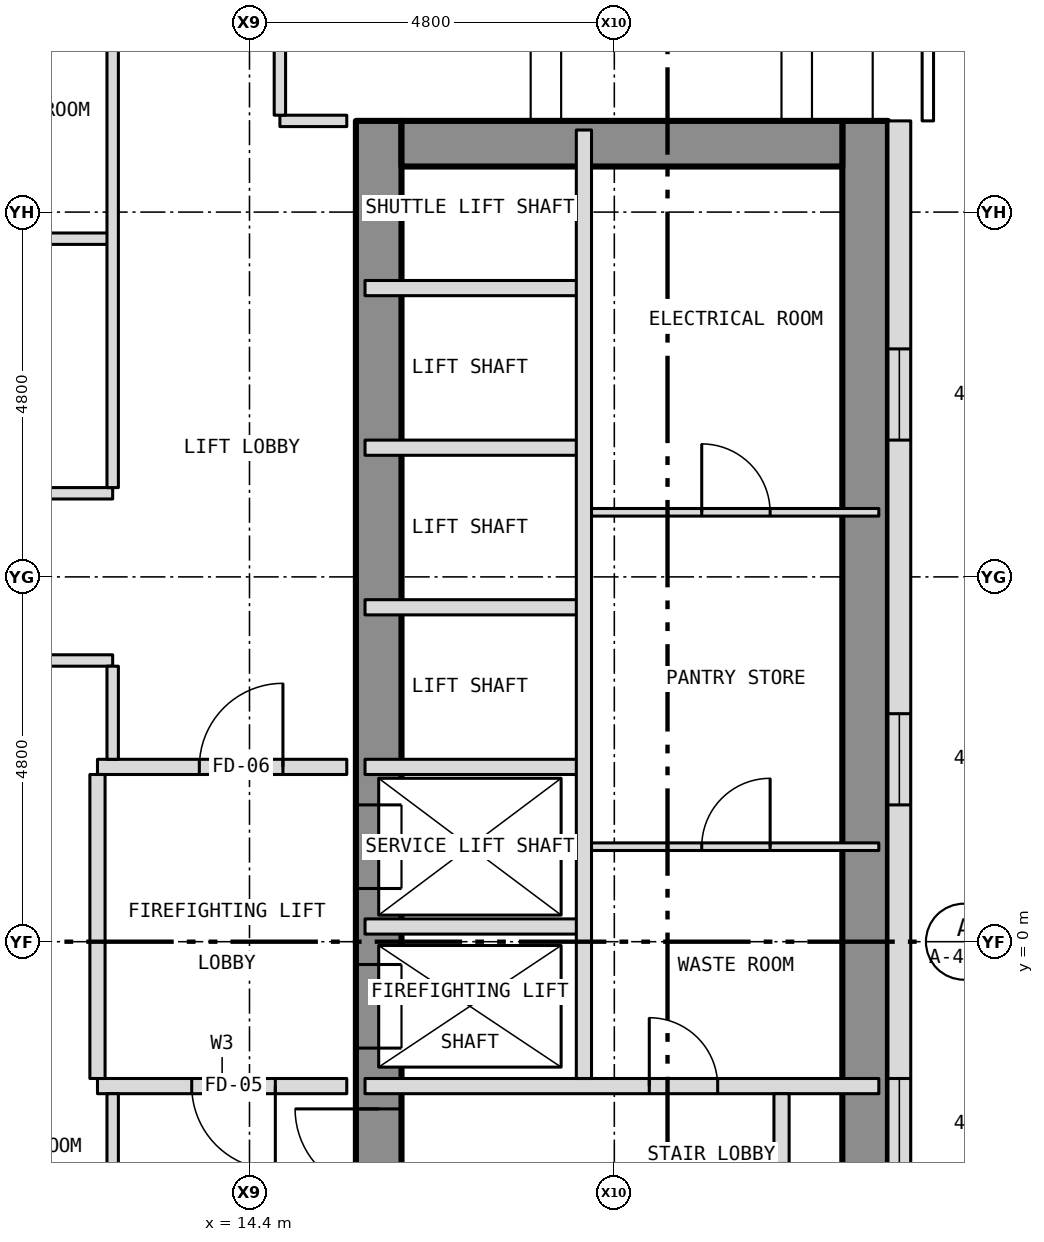
"""IFC4 building model, lengths in metres.
Left out: names, types, materials, properties, quantities, classifications, styles, units other than length and angle.
Written with IfcOpenShell. Run it as: python <this file> out.ifc"""

import sys

from ifc_helpers import new_model, si_unit, direction, frame, frame_2d, origin, place, context, subcontext, project, spatial, rectangle, extrude, element, fill, save


model = new_model("IFC4")
c1 = context("Model", 3, precision=1e-05, world=origin(), true_north=direction((0.0, 1.0)))
c2 = subcontext(c1, "Body", "Model", "MODEL_VIEW")
j1 = project(units=[si_unit("LENGTHUNIT", "METRE"), si_unit("PLANEANGLEUNIT", "RADIAN")], contexts=[c1])
p1 = place(None, origin())
s1 = spatial("IfcSite", under=j1, at=p1, CompositionType="ELEMENT")
p2 = place(p1, origin())
s2 = spatial("IfcBuilding", under=s1, at=p2, CompositionType="ELEMENT")
p3 = place(p2, frame((0.0, 0.0, 138.0)))
s3 = spatial("IfcBuildingStorey", under=s2, at=p3, CompositionType="ELEMENT", Elevation=138.0)
p4 = place(p3, frame((16.1, -10.8, 0.0), z_axis=(0.0, 0.0, 1.0), x_axis=(0.0, 1.0, 0.0)))
e1 = element("IfcWall", 1, at=p4, inside=s3, PredefinedType="SHEAR", context=c2, shape_type="SweptSolid", body=[
    extrude(rectangle(XDim=21.6, YDim=0.6, at=frame_2d((10.8, 0.0))), origin(), (0.0, 0.0, 1.0), 3.9),
])
p5 = place(p4, frame((9.4, 0.0, 0.0)))
e2 = element("IfcOpeningElement", 2, at=p5, cuts=e1, PredefinedType="OPENING", context=c2, shape_type="SweptSolid", body=[
    extrude(rectangle(XDim=1.1, YDim=2.1, at=frame_2d((0.55, 1.05))), frame((0.0, 0.312, 0.0), z_axis=(0.0, -1.0, 0.0), x_axis=(1.0, 0.0, 0.0)), (0.0, 0.0, 1.0), 0.624),
])
p6 = place(p4, frame((11.5, 0.0, 0.0)))
e3 = element("IfcOpeningElement", 3, at=p6, cuts=e1, PredefinedType="OPENING", context=c2, shape_type="SweptSolid", body=[
    extrude(rectangle(XDim=1.1, YDim=2.1, at=frame_2d((0.55, 1.05))), frame((0.0, 0.312, 0.0), z_axis=(0.0, -1.0, 0.0), x_axis=(1.0, 0.0, 0.0)), (0.0, 0.0, 1.0), 0.624),
])
p7 = place(p4, frame((5.642, 0.0, 0.0)))
e4 = element("IfcOpeningElement", 4, at=p7, cuts=e1, PredefinedType="OPENING", context=c2, shape_type="SweptSolid", body=[
    extrude(rectangle(XDim=1.1, YDim=2.1, at=frame_2d((0.55, 1.05))), frame((0.0, 0.312, 0.0), z_axis=(0.0, -1.0, 0.0), x_axis=(1.0, 0.0, 0.0)), (0.0, 0.0, 1.0), 0.624),
])
p8 = place(p4, frame((7.5, 0.0, 0.0)))
e5 = element("IfcOpeningElement", 5, at=p8, cuts=e1, PredefinedType="OPENING", context=c2, shape_type="SweptSolid", body=[
    extrude(rectangle(XDim=1.1, YDim=2.1, at=frame_2d((0.55, 1.05))), frame((0.0, 0.312, 0.0), z_axis=(0.0, -1.0, 0.0), x_axis=(1.0, 0.0, 0.0)), (0.0, 0.0, 1.0), 0.624),
])
p9 = place(p3, frame((22.5, -10.8, 0.0), z_axis=(0.0, 0.0, 1.0), x_axis=(0.0, 1.0, 0.0)))
e6 = element("IfcWall", 6, at=p9, inside=s3, PredefinedType="SHEAR", context=c2, shape_type="SweptSolid", body=[
    extrude(rectangle(XDim=21.6, YDim=0.6, at=frame_2d((10.8, 0.0))), origin(), (0.0, 0.0, 1.0), 3.9),
])
p10 = place(p3, frame((16.4, 10.5, 0.0), z_axis=(0.0, 0.0, 1.0), x_axis=(1.0, 0.0, 0.0)))
e7 = element("IfcWall", 7, at=p10, inside=s3, PredefinedType="SHEAR", context=c2, shape_type="SweptSolid", body=[
    extrude(rectangle(XDim=5.8, YDim=0.6, at=frame_2d((2.9, 0.0))), origin(), (0.0, 0.0, 1.0), 3.9),
])
p11 = place(p3, frame((22.95, -10.8, 0.0), z_axis=(0.0, 0.0, 1.0), x_axis=(0.0, 1.0, 0.0)))
e8 = element("IfcWall", 8, at=p11, inside=s3, PredefinedType="SOLIDWALL", context=c2, shape_type="SweptSolid", body=[
    extrude(rectangle(XDim=21.6, YDim=0.3, at=frame_2d((10.8, 0.0))), origin(), (0.0, 0.0, 1.0), 4.5),
])
p12 = place(p11, frame((3.0, 0.0, 2.2)))
e9 = element("IfcOpeningElement", 9, at=p12, cuts=e8, PredefinedType="OPENING", context=c2, shape_type="SweptSolid", body=[
    extrude(rectangle(XDim=1.2, YDim=0.6, at=frame_2d((0.6, 0.3))), frame((0.0, 0.162, 0.0), z_axis=(0.0, -1.0, 0.0), x_axis=(1.0, 0.0, 0.0)), (0.0, 0.0, 1.0), 0.324),
])
p13 = place(p11, frame((7.8, 0.0, 2.2)))
e10 = element("IfcOpeningElement", 10, at=p13, cuts=e8, PredefinedType="OPENING", context=c2, shape_type="SweptSolid", body=[
    extrude(rectangle(XDim=1.2, YDim=0.6, at=frame_2d((0.6, 0.3))), frame((0.0, 0.162, 0.0), z_axis=(0.0, -1.0, 0.0), x_axis=(1.0, 0.0, 0.0)), (0.0, 0.0, 1.0), 0.324),
])
p14 = place(p11, frame((12.6, 0.0, 2.2)))
e11 = element("IfcOpeningElement", 11, at=p14, cuts=e8, PredefinedType="OPENING", context=c2, shape_type="SweptSolid", body=[
    extrude(rectangle(XDim=1.2, YDim=0.6, at=frame_2d((0.6, 0.3))), frame((0.0, 0.162, 0.0), z_axis=(0.0, -1.0, 0.0), x_axis=(1.0, 0.0, 0.0)), (0.0, 0.0, 1.0), 0.324),
])
p15 = place(p11, frame((17.4, 0.0, 2.2)))
e12 = element("IfcOpeningElement", 12, at=p15, cuts=e8, PredefinedType="OPENING", context=c2, shape_type="SweptSolid", body=[
    extrude(rectangle(XDim=1.2, YDim=0.6, at=frame_2d((0.6, 0.3))), frame((0.0, 0.162, 0.0), z_axis=(0.0, -1.0, 0.0), x_axis=(1.0, 0.0, 0.0)), (0.0, 0.0, 1.0), 0.324),
])
p16 = place(p3, frame((12.4, -1.9, 0.0), z_axis=(0.0, 0.0, 1.0), x_axis=(1.0, 0.0, 0.0)))
e13 = element("IfcWall", 13, at=p16, inside=s3, PredefinedType="PARTITIONING", context=c2, shape_type="SweptSolid", body=[
    extrude(rectangle(XDim=3.28, YDim=0.2, at=frame_2d((1.64, 0.0))), origin(), (0.0, 0.0, 1.0), 4.3),
])
p17 = place(p16, frame((1.24, 0.0, 0.0)))
e14 = element("IfcOpeningElement", 14, at=p17, cuts=e13, PredefinedType="OPENING", context=c2, shape_type="SweptSolid", body=[
    extrude(rectangle(XDim=1.1, YDim=2.1, at=frame_2d((0.55, 1.05))), frame((0.0, 0.112, 0.0), z_axis=(0.0, -1.0, 0.0), x_axis=(1.0, 0.0, 0.0)), (0.0, 0.0, 1.0), 0.224),
])
p18 = place(p3, frame((15.92, -1.9, 0.0), z_axis=(0.0, 0.0, 1.0), x_axis=(1.0, 0.0, 0.0)))
e15 = element("IfcWall", 15, at=p18, inside=s3, PredefinedType="PARTITIONING", context=c2, shape_type="SweptSolid", body=[
    extrude(rectangle(XDim=6.76, YDim=0.2, at=frame_2d((3.38, 0.0))), origin(), (0.0, 0.0, 1.0), 3.9),
])
p19 = place(p18, frame((3.74, 0.0, 0.0)))
e16 = element("IfcOpeningElement", 16, at=p19, cuts=e15, PredefinedType="OPENING", context=c2, shape_type="SweptSolid", body=[
    extrude(rectangle(XDim=0.9, YDim=2.1, at=frame_2d((0.45, 1.05))), frame((0.0, 0.112, 0.0), z_axis=(0.0, -1.0, 0.0), x_axis=(1.0, 0.0, 0.0)), (0.0, 0.0, 1.0), 0.224),
])
p20 = place(p3, frame((15.92, 0.2, 0.0), z_axis=(0.0, 0.0, 1.0), x_axis=(1.0, 0.0, 0.0)))
e17 = element("IfcWall", 17, at=p20, inside=s3, PredefinedType="PARTITIONING", context=c2, shape_type="SweptSolid", body=[
    extrude(rectangle(XDim=2.88, YDim=0.2, at=frame_2d((1.44, 0.0))), origin(), (0.0, 0.0, 1.0), 3.9),
])
p21 = place(p3, frame((18.8, 1.25, 0.0), z_axis=(0.0, 0.0, 1.0), x_axis=(1.0, 0.0, 0.0)))
e18 = element("IfcWall", 18, at=p21, inside=s3, PredefinedType="PARTITIONING", context=c2, shape_type="SweptSolid", body=[
    extrude(rectangle(XDim=3.88, YDim=0.1, at=frame_2d((1.94, 0.0))), origin(), (0.0, 0.0, 1.0), 3.9),
])
p22 = place(p21, frame((1.55, 0.0, 0.0)))
e19 = element("IfcOpeningElement", 19, at=p22, cuts=e18, PredefinedType="OPENING", context=c2, shape_type="SweptSolid", body=[
    extrude(rectangle(XDim=0.9, YDim=2.1, at=frame_2d((0.45, 1.05))), frame((0.0, 0.062, 0.0), z_axis=(0.0, -1.0, 0.0), x_axis=(1.0, 0.0, 0.0)), (0.0, 0.0, 1.0), 0.124),
])
p23 = place(p3, frame((12.4, 2.3, 0.0), z_axis=(0.0, 0.0, 1.0), x_axis=(1.0, 0.0, 0.0)))
e20 = element("IfcWall", 20, at=p23, inside=s3, PredefinedType="PARTITIONING", context=c2, shape_type="SweptSolid", body=[
    extrude(rectangle(XDim=3.28, YDim=0.2, at=frame_2d((1.64, 0.0))), origin(), (0.0, 0.0, 1.0), 4.3),
])
p24 = place(p23, frame((1.34, 0.0, 0.0)))
e21 = element("IfcOpeningElement", 21, at=p24, cuts=e20, PredefinedType="OPENING", context=c2, shape_type="SweptSolid", body=[
    extrude(rectangle(XDim=1.1, YDim=2.1, at=frame_2d((0.55, 1.05))), frame((0.0, 0.112, 0.0), z_axis=(0.0, -1.0, 0.0), x_axis=(1.0, 0.0, 0.0)), (0.0, 0.0, 1.0), 0.224),
])
p25 = place(p3, frame((15.92, 2.3, 0.0), z_axis=(0.0, 0.0, 1.0), x_axis=(1.0, 0.0, 0.0)))
e22 = element("IfcWall", 22, at=p25, inside=s3, PredefinedType="PARTITIONING", context=c2, shape_type="SweptSolid", body=[
    extrude(rectangle(XDim=2.88, YDim=0.2, at=frame_2d((1.44, 0.0))), origin(), (0.0, 0.0, 1.0), 3.9),
])
p26 = place(p3, frame((5.9, 3.7, 0.0), z_axis=(0.0, 0.0, 1.0), x_axis=(1.0, 0.0, 0.0)))
e23 = element("IfcWall", 23, at=p26, inside=s3, PredefinedType="PARTITIONING", context=c2, shape_type="SweptSolid", body=[
    extrude(rectangle(XDim=6.7, YDim=0.15, at=frame_2d((3.35, 0.0))), origin(), (0.0, 0.0, 1.0), 4.3),
])
p27 = place(p26, frame((4.575, 0.0, 0.0)))
e24 = element("IfcOpeningElement", 24, at=p27, cuts=e23, PredefinedType="OPENING", context=c2, shape_type="SweptSolid", body=[
    extrude(rectangle(XDim=0.9, YDim=2.1, at=frame_2d((0.45, 1.05))), frame((0.0, 0.087, 0.0), z_axis=(0.0, -1.0, 0.0), x_axis=(1.0, 0.0, 0.0)), (0.0, 0.0, 1.0), 0.174),
])
p28 = place(p3, frame((15.92, 4.4, 0.0), z_axis=(0.0, 0.0, 1.0), x_axis=(1.0, 0.0, 0.0)))
e25 = element("IfcWall", 25, at=p28, inside=s3, PredefinedType="PARTITIONING", context=c2, shape_type="SweptSolid", body=[
    extrude(rectangle(XDim=2.88, YDim=0.2, at=frame_2d((1.44, 0.0))), origin(), (0.0, 0.0, 1.0), 3.9),
])
p29 = place(p3, frame((18.8, 5.65, 0.0), z_axis=(0.0, 0.0, 1.0), x_axis=(1.0, 0.0, 0.0)))
e26 = element("IfcWall", 26, at=p29, inside=s3, PredefinedType="PARTITIONING", context=c2, shape_type="SweptSolid", body=[
    extrude(rectangle(XDim=3.88, YDim=0.1, at=frame_2d((1.94, 0.0))), origin(), (0.0, 0.0, 1.0), 3.9),
])
p30 = place(p29, frame((1.55, 0.0, 0.0)))
e27 = element("IfcOpeningElement", 27, at=p30, cuts=e26, PredefinedType="OPENING", context=c2, shape_type="SweptSolid", body=[
    extrude(rectangle(XDim=0.9, YDim=2.1, at=frame_2d((0.45, 1.05))), frame((0.0, 0.062, 0.0), z_axis=(0.0, -1.0, 0.0), x_axis=(1.0, 0.0, 0.0)), (0.0, 0.0, 1.0), 0.124),
])
p31 = place(p3, frame((5.9, 5.9, 0.0), z_axis=(0.0, 0.0, 1.0), x_axis=(1.0, 0.0, 0.0)))
e28 = element("IfcWall", 28, at=p31, inside=s3, PredefinedType="PARTITIONING", context=c2, shape_type="SweptSolid", body=[
    extrude(rectangle(XDim=6.7, YDim=0.15, at=frame_2d((3.35, 0.0))), origin(), (0.0, 0.0, 1.0), 4.3),
])
p32 = place(p31, frame((1.225, 0.0, 0.0)))
e29 = element("IfcOpeningElement", 29, at=p32, cuts=e28, PredefinedType="OPENING", context=c2, shape_type="SweptSolid", body=[
    extrude(rectangle(XDim=0.9, YDim=2.1, at=frame_2d((0.45, 1.05))), frame((0.0, 0.087, 0.0), z_axis=(0.0, -1.0, 0.0), x_axis=(1.0, 0.0, 0.0)), (0.0, 0.0, 1.0), 0.174),
])
p33 = place(p31, frame((4.575, 0.0, 0.0)))
e30 = element("IfcOpeningElement", 30, at=p33, cuts=e28, PredefinedType="OPENING", context=c2, shape_type="SweptSolid", body=[
    extrude(rectangle(XDim=0.9, YDim=2.1, at=frame_2d((0.45, 1.05))), frame((0.0, 0.087, 0.0), z_axis=(0.0, -1.0, 0.0), x_axis=(1.0, 0.0, 0.0)), (0.0, 0.0, 1.0), 0.174),
])
for number, where, z_axis, x_axis in (
    (31, (15.92, 6.5, 0.0), (0.0, 0.0, 1.0), (1.0, 0.0, 0.0)),
    (32, (15.92, 8.6, 0.0), (0.0, 0.0, 1.0), (1.0, 0.0, 0.0)),
):
    element("IfcWall", number, at=place(p3, frame(where, z_axis=z_axis, x_axis=x_axis)), inside=s3, PredefinedType="PARTITIONING", context=c2, shape_type="SweptSolid", body=[
        extrude(rectangle(XDim=2.88, YDim=0.2, at=frame_2d((1.44, 0.0))), origin(), (0.0, 0.0, 1.0), 3.9),
    ])
p34 = place(p3, frame((5.9, 9.25, 0.0), z_axis=(0.0, 0.0, 1.0), x_axis=(1.0, 0.0, 0.0)))
e33 = element("IfcWall", 33, at=p34, inside=s3, PredefinedType="PARTITIONING", context=c2, shape_type="SweptSolid", body=[
    extrude(rectangle(XDim=6.7, YDim=0.15, at=frame_2d((3.35, 0.0))), origin(), (0.0, 0.0, 1.0), 4.3),
])
p35 = place(p3, frame((14.8, 10.8, 0.0), z_axis=(0.0, 0.0, 1.0), x_axis=(1.0, 0.0, 0.0)))
e34 = element("IfcWall", 34, at=p35, inside=s3, PredefinedType="PARTITIONING", context=c2, shape_type="SweptSolid", body=[
    extrude(rectangle(XDim=0.88, YDim=0.15, at=frame_2d((0.44, 0.0))), origin(), (0.0, 0.0, 1.0), 4.3),
])
p36 = place(p3, frame((12.4, -1.8, 0.0), z_axis=(0.0, 0.0, 1.0), x_axis=(0.0, 1.0, 0.0)))
e35 = element("IfcWall", 35, at=p36, inside=s3, PredefinedType="PARTITIONING", context=c2, shape_type="SweptSolid", body=[
    extrude(rectangle(XDim=4.0, YDim=0.2, at=frame_2d((2.0, 0.0))), origin(), (0.0, 0.0, 1.0), 4.3),
])
p37 = place(p3, frame((12.6, -12.525, 0.0), z_axis=(0.0, 0.0, 1.0), x_axis=(0.0, 1.0, 0.0)))
e36 = element("IfcWall", 36, at=p37, inside=s3, PredefinedType="PARTITIONING", context=c2, shape_type="SweptSolid", body=[
    extrude(rectangle(XDim=10.525, YDim=0.15, at=frame_2d((5.262, 0.0))), origin(), (0.0, 0.0, 1.0), 4.3),
])
p38 = place(p37, frame((3.55, 0.0, 0.0)))
e37 = element("IfcOpeningElement", 37, at=p38, cuts=e36, PredefinedType="OPENING", context=c2, shape_type="SweptSolid", body=[
    extrude(rectangle(XDim=0.9, YDim=2.1, at=frame_2d((0.45, 1.05))), frame((0.0, 0.087, 0.0), z_axis=(0.0, -1.0, 0.0), x_axis=(1.0, 0.0, 0.0)), (0.0, 0.0, 1.0), 0.174),
])
p39 = place(p3, frame((12.6, 2.4, 0.0), z_axis=(0.0, 0.0, 1.0), x_axis=(0.0, 1.0, 0.0)))
e38 = element("IfcWall", 38, at=p39, inside=s3, PredefinedType="PARTITIONING", context=c2, shape_type="SweptSolid", body=[
    extrude(rectangle(XDim=1.225, YDim=0.15, at=frame_2d((0.613, 0.0))), origin(), (0.0, 0.0, 1.0), 4.3),
])
p40 = place(p3, frame((12.6, 5.975, 0.0), z_axis=(0.0, 0.0, 1.0), x_axis=(0.0, 1.0, 0.0)))
e39 = element("IfcWall", 39, at=p40, inside=s3, PredefinedType="PARTITIONING", context=c2, shape_type="SweptSolid", body=[
    extrude(rectangle(XDim=6.55, YDim=0.15, at=frame_2d((3.275, 0.0))), origin(), (0.0, 0.0, 1.0), 4.3),
])
p41 = place(p3, frame((14.8, 10.875, 0.0), z_axis=(0.0, 0.0, 1.0), x_axis=(0.0, 1.0, 0.0)))
e40 = element("IfcWall", 40, at=p41, inside=s3, PredefinedType="PARTITIONING", context=c2, shape_type="SweptSolid", body=[
    extrude(rectangle(XDim=3.85, YDim=0.15, at=frame_2d((1.925, 0.0))), origin(), (0.0, 0.0, 1.0), 4.3),
])
p42 = place(p41, frame((1.025, 0.0, 0.0)))
e41 = element("IfcOpeningElement", 41, at=p42, cuts=e40, PredefinedType="OPENING", context=c2, shape_type="SweptSolid", body=[
    extrude(rectangle(XDim=1.8, YDim=2.1, at=frame_2d((0.9, 1.05))), frame((0.0, 0.087, 0.0), z_axis=(0.0, -1.0, 0.0), x_axis=(1.0, 0.0, 0.0)), (0.0, 0.0, 1.0), 0.174),
])
p43 = place(p3, frame((18.8, -1.8, 0.0), z_axis=(0.0, 0.0, 1.0), x_axis=(0.0, 1.0, 0.0)))
e42 = element("IfcWall", 42, at=p43, inside=s3, PredefinedType="PARTITIONING", context=c2, shape_type="SweptSolid", body=[
    extrude(rectangle(XDim=12.48, YDim=0.2, at=frame_2d((6.24, 0.0))), origin(), (0.0, 0.0, 1.0), 3.9),
])
p44 = place(p3, frame((21.4, -10.68, 0.0), z_axis=(0.0, 0.0, 1.0), x_axis=(0.0, 1.0, 0.0)))
e43 = element("IfcWall", 43, at=p44, inside=s3, PredefinedType="PARTITIONING", context=c2, shape_type="SweptSolid", body=[
    extrude(rectangle(XDim=8.68, YDim=0.2, at=frame_2d((4.34, 0.0))), origin(), (0.0, 0.0, 1.0), 3.9),
])
p45 = place(p44, frame((0.899, 0.0, 0.0)))
e44 = element("IfcOpeningElement", 44, at=p45, cuts=e43, PredefinedType="OPENING", context=c2, shape_type="SweptSolid", body=[
    extrude(rectangle(XDim=0.9, YDim=2.1, at=frame_2d((0.45, 1.05))), frame((0.0, 0.112, 0.0), z_axis=(0.0, -1.0, 0.0), x_axis=(1.0, 0.0, 0.0)), (0.0, 0.0, 1.0), 0.224),
])
p46 = place(p44, frame((3.88, 0.0, 0.0)))
e45 = element("IfcOpeningElement", 45, at=p46, cuts=e43, PredefinedType="OPENING", context=c2, shape_type="SweptSolid", body=[
    extrude(rectangle(XDim=0.9, YDim=2.1, at=frame_2d((0.45, 1.05))), frame((0.0, 0.112, 0.0), z_axis=(0.0, -1.0, 0.0), x_axis=(1.0, 0.0, 0.0)), (0.0, 0.0, 1.0), 0.224),
])
p47 = place(p44, frame((6.862, 0.0, 0.0)))
e46 = element("IfcOpeningElement", 46, at=p47, cuts=e43, PredefinedType="OPENING", context=c2, shape_type="SweptSolid", body=[
    extrude(rectangle(XDim=0.9, YDim=2.1, at=frame_2d((0.45, 1.05))), frame((0.0, 0.112, 0.0), z_axis=(0.0, -1.0, 0.0), x_axis=(1.0, 0.0, 0.0)), (0.0, 0.0, 1.0), 0.224),
])
p48 = place(p13, origin())
e47 = element("IfcWindow", 47, at=p48, inside=s3, PartitioningType="SINGLE_PANEL", PredefinedType="WINDOW", context=c2, shape_type="SweptSolid", body=[
    extrude(rectangle(XDim=1.2, YDim=0.6, at=frame_2d((0.6, 0.3))), frame((0.0, -0.06, 0.0), z_axis=(0.0, -1.0, 0.0), x_axis=(1.0, 0.0, 0.0)), (0.0, 0.0, 1.0), 0.06),
])
fill(e10, e47)
p49 = place(p14, origin())
e48 = element("IfcWindow", 48, at=p49, inside=s3, PartitioningType="SINGLE_PANEL", PredefinedType="WINDOW", context=c2, shape_type="SweptSolid", body=[
    extrude(rectangle(XDim=1.2, YDim=0.6, at=frame_2d((0.6, 0.3))), frame((0.0, -0.06, 0.0), z_axis=(0.0, -1.0, 0.0), x_axis=(1.0, 0.0, 0.0)), (0.0, 0.0, 1.0), 0.06),
])
fill(e11, e48)
p50 = place(p15, origin())
e49 = element("IfcWindow", 49, at=p50, inside=s3, PartitioningType="SINGLE_PANEL", PredefinedType="WINDOW", context=c2, shape_type="SweptSolid", body=[
    extrude(rectangle(XDim=1.2, YDim=0.6, at=frame_2d((0.6, 0.3))), frame((0.0, -0.06, 0.0), z_axis=(0.0, -1.0, 0.0), x_axis=(1.0, 0.0, 0.0)), (0.0, 0.0, 1.0), 0.06),
])
fill(e12, e49)
p51 = place(p5, origin())
e50 = element("IfcDoor", 50, at=p51, inside=s3, OperationType="SLIDING_TO_LEFT", PredefinedType="DOOR", context=c2, shape_type="SweptSolid", body=[
    extrude(rectangle(XDim=1.1, YDim=2.1, at=frame_2d((0.55, 1.05))), frame((0.0, 0.025, 0.0), z_axis=(0.0, -1.0, 0.0), x_axis=(1.0, 0.0, 0.0)), (0.0, 0.0, 1.0), 0.05),
])
fill(e2, e50)
p52 = place(p6, origin())
e51 = element("IfcDoor", 51, at=p52, inside=s3, OperationType="SLIDING_TO_LEFT", PredefinedType="DOOR", context=c2, shape_type="SweptSolid", body=[
    extrude(rectangle(XDim=1.1, YDim=2.1, at=frame_2d((0.55, 1.05))), frame((0.0, 0.025, 0.0), z_axis=(0.0, -1.0, 0.0), x_axis=(1.0, 0.0, 0.0)), (0.0, 0.0, 1.0), 0.05),
])
fill(e3, e51)
p53 = place(p8, origin())
e52 = element("IfcDoor", 52, at=p53, inside=s3, OperationType="SINGLE_SWING_RIGHT", PredefinedType="DOOR", context=c2, shape_type="SweptSolid", body=[
    extrude(rectangle(XDim=1.1, YDim=2.1, at=frame_2d((0.55, 1.05))), frame((0.0, 0.025, 0.0), z_axis=(0.0, -1.0, 0.0), x_axis=(1.0, 0.0, 0.0)), (0.0, 0.0, 1.0), 0.05),
])
fill(e5, e52)
p54 = place(p19, origin())
e53 = element("IfcDoor", 53, at=p54, inside=s3, OperationType="SINGLE_SWING_LEFT", PredefinedType="DOOR", context=c2, shape_type="SweptSolid", body=[
    extrude(rectangle(XDim=0.9, YDim=2.1, at=frame_2d((0.45, 1.05))), frame((0.0, 0.025, 0.0), z_axis=(0.0, -1.0, 0.0), x_axis=(1.0, 0.0, 0.0)), (0.0, 0.0, 1.0), 0.05),
])
fill(e16, e53)
p55 = place(p22, origin())
e54 = element("IfcDoor", 54, at=p55, inside=s3, OperationType="SINGLE_SWING_RIGHT", PredefinedType="DOOR", context=c2, shape_type="SweptSolid", body=[
    extrude(rectangle(XDim=0.9, YDim=2.1, at=frame_2d((0.45, 1.05))), frame((0.0, 0.025, 0.0), z_axis=(0.0, -1.0, 0.0), x_axis=(1.0, 0.0, 0.0)), (0.0, 0.0, 1.0), 0.05),
])
fill(e19, e54)
p56 = place(p30, origin())
e55 = element("IfcDoor", 55, at=p56, inside=s3, OperationType="SINGLE_SWING_LEFT", PredefinedType="DOOR", context=c2, shape_type="SweptSolid", body=[
    extrude(rectangle(XDim=0.9, YDim=2.1, at=frame_2d((0.45, 1.05))), frame((0.0, 0.025, 0.0), z_axis=(0.0, -1.0, 0.0), x_axis=(1.0, 0.0, 0.0)), (0.0, 0.0, 1.0), 0.05),
])
fill(e27, e55)
p57 = place(p17, origin())
e56 = element("IfcDoor", 56, at=p57, inside=s3, OperationType="SINGLE_SWING_RIGHT", PredefinedType="DOOR", context=c2, shape_type="SweptSolid", body=[
    extrude(rectangle(XDim=1.1, YDim=2.1, at=frame_2d((0.55, 1.05))), frame((0.0, 0.025, 0.0), z_axis=(0.0, -1.0, 0.0), x_axis=(1.0, 0.0, 0.0)), (0.0, 0.0, 1.0), 0.05),
])
fill(e14, e56)
p58 = place(p24, origin())
e57 = element("IfcDoor", 57, at=p58, inside=s3, OperationType="SINGLE_SWING_RIGHT", PredefinedType="DOOR", context=c2, shape_type="SweptSolid", body=[
    extrude(rectangle(XDim=1.1, YDim=2.1, at=frame_2d((0.55, 1.05))), frame((0.0, 0.025, 0.0), z_axis=(0.0, -1.0, 0.0), x_axis=(1.0, 0.0, 0.0)), (0.0, 0.0, 1.0), 0.05),
])
fill(e21, e57)
save(model, sys.argv[1])
